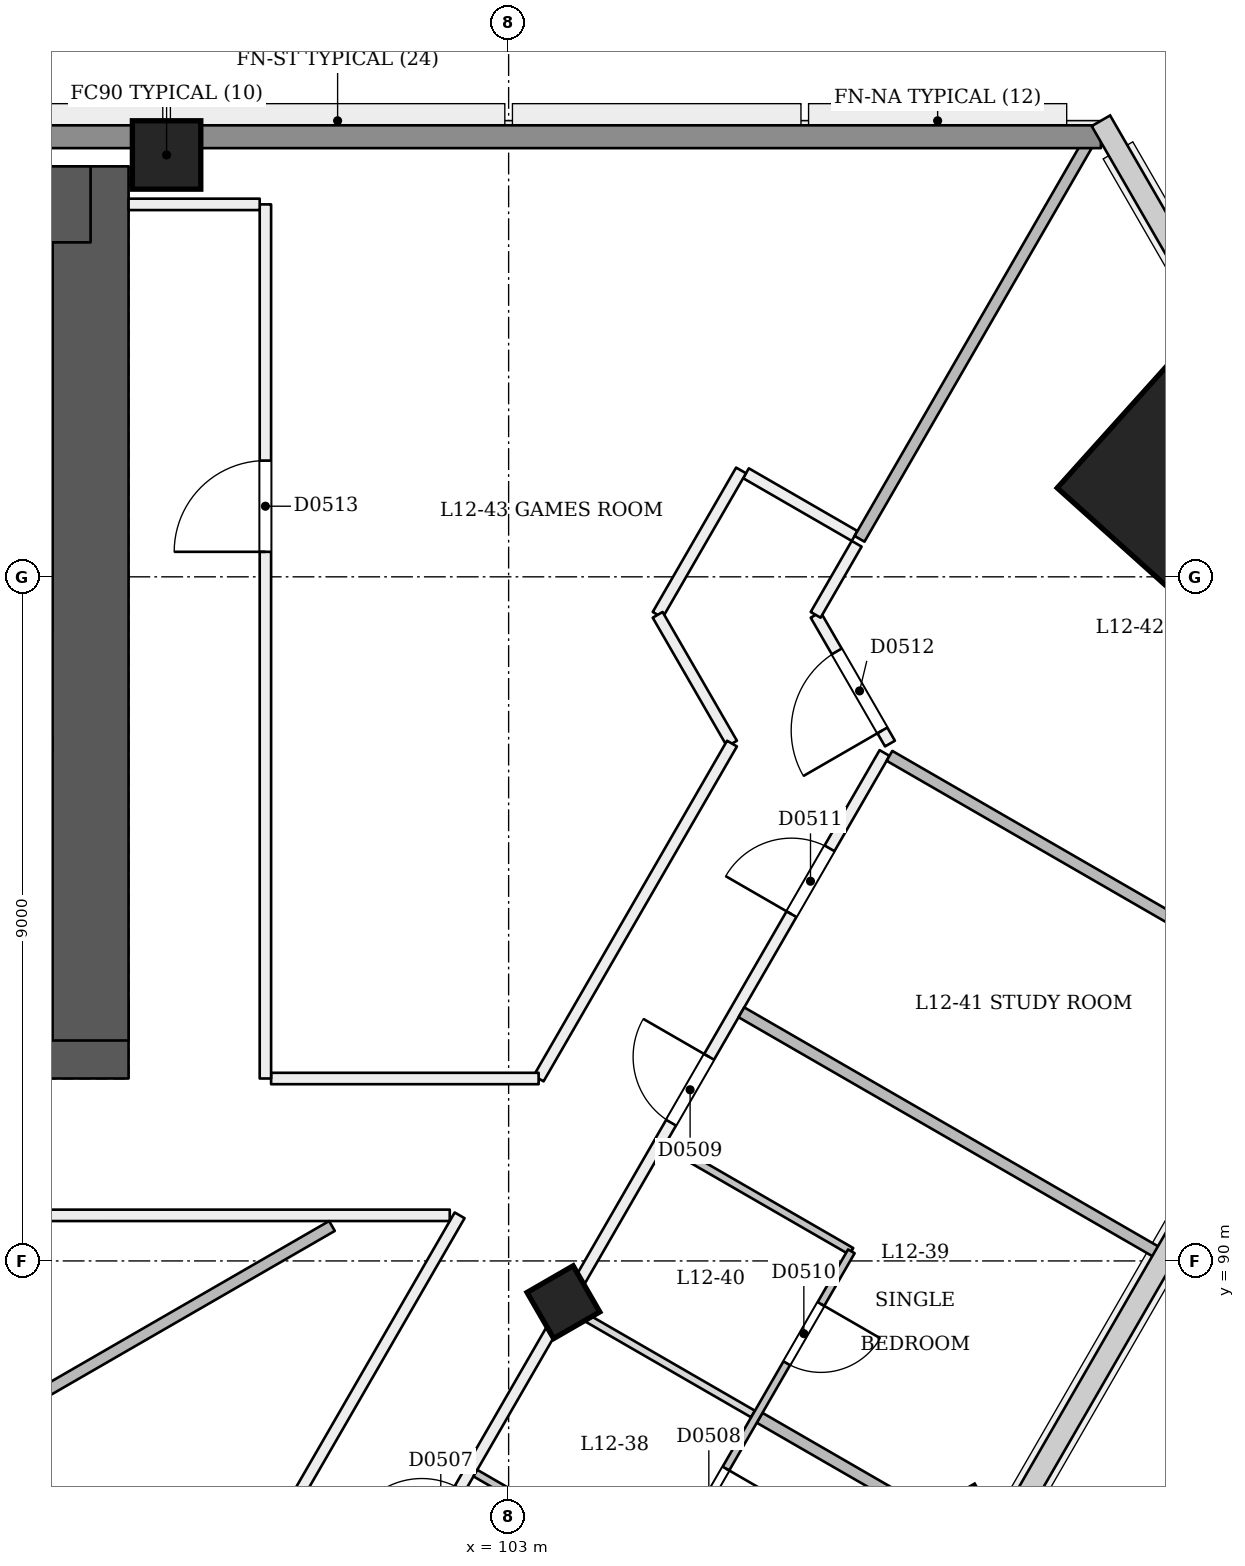
"""IFC4 building model, lengths in metres.
Left out: names, types, materials, properties, quantities, classifications, styles, units other than length and angle.
Written with IfcOpenShell. Run it as: python <this file> out.ifc"""

import sys

from ifc_helpers import new_model, si_unit, direction, frame, frame_2d, origin, origin_2d, place, context, subcontext, project, spatial, rectangle, extrude, element, fill, save


model = new_model("IFC4")
c1 = context("Model", 3, precision=1e-05, world=origin(), true_north=direction((0.0, 1.0)))
c2 = subcontext(c1, "Body", "Model", "MODEL_VIEW")
j1 = project(units=[si_unit("LENGTHUNIT", "METRE"), si_unit("PLANEANGLEUNIT", "RADIAN")], contexts=[c1])
p1 = place(None, origin())
s1 = spatial("IfcSite", under=j1, at=p1, CompositionType="ELEMENT")
p2 = place(p1, origin())
s2 = spatial("IfcBuilding", under=s1, at=p2, CompositionType="ELEMENT")
p3 = place(p2, frame((0.0, 0.0, 52.2)))
s3 = spatial("IfcBuildingStorey", under=s2, at=p3, CompositionType="ELEMENT", Elevation=52.2)
p4 = place(p3, frame((72.5, 92.9, 0.0), z_axis=(0.0, 0.0, 1.0), x_axis=(1.0, 0.0, 0.0)))
e1 = element("IfcWall", 1, at=p4, inside=s3, PredefinedType="SHEAR", context=c2, shape_type="SweptSolid", body=[
    extrude(rectangle(XDim=25.5, YDim=1.0, at=frame_2d((12.75, 0.0))), origin(), (0.0, 0.0, 1.0), 3.6),
])
p5 = place(p4, frame((1.3, 0.0, 0.0)))
e2 = element("IfcOpeningElement", 2, at=p5, cuts=e1, PredefinedType="OPENING", context=c2, shape_type="SweptSolid", body=[
    extrude(rectangle(XDim=1.2, YDim=2.1, at=frame_2d((0.6, 1.05))), frame((0.0, 0.51, 0.0), z_axis=(0.0, -1.0, 0.0), x_axis=(1.0, 0.0, 0.0)), (0.0, 0.0, 1.0), 1.021),
])
p6 = place(p4, frame((3.5, 0.0, 0.0)))
e3 = element("IfcOpeningElement", 3, at=p6, cuts=e1, PredefinedType="OPENING", context=c2, shape_type="SweptSolid", body=[
    extrude(rectangle(XDim=1.2, YDim=2.1, at=frame_2d((0.6, 1.05))), frame((0.0, 0.51, 0.0), z_axis=(0.0, -1.0, 0.0), x_axis=(1.0, 0.0, 0.0)), (0.0, 0.0, 1.0), 1.021),
])
p7 = place(p4, frame((13.5, 0.0, 0.0)))
e4 = element("IfcOpeningElement", 4, at=p7, cuts=e1, PredefinedType="OPENING", context=c2, shape_type="SweptSolid", body=[
    extrude(rectangle(XDim=1.2, YDim=2.1, at=frame_2d((0.6, 1.05))), frame((0.0, 0.51, 0.0), z_axis=(0.0, -1.0, 0.0), x_axis=(1.0, 0.0, 0.0)), (0.0, 0.0, 1.0), 1.021),
])
p8 = place(p4, frame((15.462, 0.0, 0.0)))
e5 = element("IfcOpeningElement", 5, at=p8, cuts=e1, PredefinedType="OPENING", context=c2, shape_type="SweptSolid", body=[
    extrude(rectangle(XDim=1.0, YDim=2.1, at=frame_2d((0.5, 1.05))), frame((0.0, 0.51, 0.0), z_axis=(0.0, -1.0, 0.0), x_axis=(1.0, 0.0, 0.0)), (0.0, 0.0, 1.0), 1.021),
])
p9 = place(p4, frame((18.3, 0.0, 0.0)))
e6 = element("IfcOpeningElement", 6, at=p9, cuts=e1, PredefinedType="OPENING", context=c2, shape_type="SweptSolid", body=[
    extrude(rectangle(XDim=1.0, YDim=2.1, at=frame_2d((0.5, 1.05))), frame((0.0, 0.51, 0.0), z_axis=(0.0, -1.0, 0.0), x_axis=(1.0, 0.0, 0.0)), (0.0, 0.0, 1.0), 1.021),
])
p10 = place(p4, frame((21.2, 0.0, 0.0)))
e7 = element("IfcOpeningElement", 7, at=p10, cuts=e1, PredefinedType="OPENING", context=c2, shape_type="SweptSolid", body=[
    extrude(rectangle(XDim=1.0, YDim=2.1, at=frame_2d((0.5, 1.05))), frame((0.0, 0.51, 0.0), z_axis=(0.0, -1.0, 0.0), x_axis=(1.0, 0.0, 0.0)), (0.0, 0.0, 1.0), 1.021),
])
p11 = place(p4, frame((23.087, 0.0, 0.0)))
e8 = element("IfcOpeningElement", 8, at=p11, cuts=e1, PredefinedType="OPENING", context=c2, shape_type="SweptSolid", body=[
    extrude(rectangle(XDim=1.0, YDim=2.1, at=frame_2d((0.5, 1.05))), frame((0.0, 0.51, 0.0), z_axis=(0.0, -1.0, 0.0), x_axis=(1.0, 0.0, 0.0)), (0.0, 0.0, 1.0), 1.021),
])
p12 = place(p3, frame((97.5, 92.9, 0.0), z_axis=(0.0, 0.0, 1.0), x_axis=(0.0, 1.0, 0.0)))
e9 = element("IfcWall", 9, at=p12, inside=s3, PredefinedType="SHEAR", context=c2, shape_type="SweptSolid", body=[
    extrude(rectangle(XDim=11.5, YDim=1.0, at=frame_2d((5.75, 0.0))), origin(), (0.0, 0.0, 1.0), 3.6),
])
p13 = place(p3, frame((97.5, 103.9, 0.0), z_axis=(0.0, 0.0, 1.0), x_axis=(-1.0, 0.0, 0.0)))
e10 = element("IfcWall", 10, at=p13, inside=s3, PredefinedType="SHEAR", context=c2, shape_type="SweptSolid", body=[
    extrude(rectangle(XDim=25.5, YDim=1.0, at=frame_2d((12.75, 0.0))), origin(), (0.0, 0.0, 1.0), 3.6),
])
p14 = place(p3, frame((103.748, 89.41, -0.021), z_axis=(-0.02215369191, 0.038413282303, 0.999016333038), x_axis=(-0.500660054594, -0.865359998658, 0.022171658849)))
e11 = element("IfcColumn", 11, at=p14, inside=s3, PredefinedType="COLUMN", context=c2, shape_type="SweptSolid", body=[
    extrude(rectangle(XDim=0.7, YDim=0.7, at=origin_2d()), origin(), (0.0, 0.0, 1.0), 3.604),
])
p15 = place(p3, frame((112.031, 100.253, 0.0), z_axis=(-0.028401796786, 0.009286506348, 0.999553449666), x_axis=(0.49888889343, -0.8663809353, 0.02222491757)))
e12 = element("IfcColumn", 12, at=p15, inside=s3, PredefinedType="COLUMN", context=c2, shape_type="SweptSolid", body=[
    extrude(rectangle(XDim=2.52, YDim=2.52, at=origin_2d()), origin(), (0.0, 0.0, 1.0), 3.602),
])
p16 = place(p3, frame((98.5, 104.55, 0.0), z_axis=(0.0, 0.0, 1.0), x_axis=(1.0, 0.0, 0.0)))
e13 = element("IfcColumn", 13, at=p16, inside=s3, PredefinedType="COLUMN", context=c2, shape_type="SweptSolid", body=[
    extrude(rectangle(XDim=0.9, YDim=0.9, at=origin_2d()), origin(), (0.0, 0.0, 1.0), 3.6),
])
p17 = place(p3, frame((108.988, 86.385, -0.027), z_axis=(-0.02222134892, 0.038480872521, 0.999012229206), x_axis=(-0.500177221778, -0.865637981187, 0.022217838368)))
e14 = element("IfcColumn", 14, at=p17, inside=s3, PredefinedType="COLUMN", context=c2, shape_type="SweptSolid", body=[
    extrude(rectangle(XDim=0.9, YDim=0.9, at=origin_2d()), origin(), (0.0, 0.0, 1.0), 3.604),
])
p18 = place(p3, frame((86.05, 58.757, 0.0), z_axis=(0.0, 0.0, 1.0), x_axis=(0.499999296855, 0.866025809745, 0.0)))
e15 = element("IfcWall", 15, at=p18, inside=s3, PredefinedType="PARTITIONING", context=c2, shape_type="SweptSolid", body=[
    extrude(rectangle(XDim=43.792, YDim=0.15, at=frame_2d((21.896, 0.0))), origin(), (0.0, 0.0, 1.0), 2.7),
])
p19 = place(p18, frame((3.598, 0.0, 0.0)))
e16 = element("IfcOpeningElement", 16, at=p19, cuts=e15, PredefinedType="OPENING", context=c2, shape_type="SweptSolid", body=[
    extrude(rectangle(XDim=1.2, YDim=2.1, at=frame_2d((0.6, 1.05))), frame((0.0, 0.085, 0.0), z_axis=(0.0, -1.0, 0.0), x_axis=(1.0, 0.0, 0.0)), (0.0, 0.0, 1.0), 0.171),
])
p20 = place(p18, frame((11.176, 0.0, 0.0)))
e17 = element("IfcOpeningElement", 17, at=p20, cuts=e15, PredefinedType="OPENING", context=c2, shape_type="SweptSolid", body=[
    extrude(rectangle(XDim=1.0, YDim=2.1, at=frame_2d((0.5, 1.05))), frame((0.0, 0.085, 0.0), z_axis=(0.0, -1.0, 0.0), x_axis=(1.0, 0.0, 0.0)), (0.0, 0.0, 1.0), 0.171),
])
p21 = place(p18, frame((13.616, 0.0, 0.0)))
e18 = element("IfcOpeningElement", 18, at=p21, cuts=e15, PredefinedType="OPENING", context=c2, shape_type="SweptSolid", body=[
    extrude(rectangle(XDim=1.0, YDim=2.1, at=frame_2d((0.5, 1.05))), frame((0.0, 0.085, 0.0), z_axis=(0.0, -1.0, 0.0), x_axis=(1.0, 0.0, 0.0)), (0.0, 0.0, 1.0), 0.171),
])
p22 = place(p18, frame((20.176, 0.0, 0.0)))
e19 = element("IfcOpeningElement", 19, at=p22, cuts=e15, PredefinedType="OPENING", context=c2, shape_type="SweptSolid", body=[
    extrude(rectangle(XDim=1.0, YDim=2.1, at=frame_2d((0.5, 1.05))), frame((0.0, 0.085, 0.0), z_axis=(0.0, -1.0, 0.0), x_axis=(1.0, 0.0, 0.0)), (0.0, 0.0, 1.0), 0.171),
])
p23 = place(p18, frame((22.616, 0.0, 0.0)))
e20 = element("IfcOpeningElement", 20, at=p23, cuts=e15, PredefinedType="OPENING", context=c2, shape_type="SweptSolid", body=[
    extrude(rectangle(XDim=1.0, YDim=2.1, at=frame_2d((0.5, 1.05))), frame((0.0, 0.085, 0.0), z_axis=(0.0, -1.0, 0.0), x_axis=(1.0, 0.0, 0.0)), (0.0, 0.0, 1.0), 0.171),
])
p24 = place(p18, frame((29.176, 0.0, 0.0)))
e21 = element("IfcOpeningElement", 21, at=p24, cuts=e15, PredefinedType="OPENING", context=c2, shape_type="SweptSolid", body=[
    extrude(rectangle(XDim=1.0, YDim=2.1, at=frame_2d((0.5, 1.05))), frame((0.0, 0.085, 0.0), z_axis=(0.0, -1.0, 0.0), x_axis=(1.0, 0.0, 0.0)), (0.0, 0.0, 1.0), 0.171),
])
p25 = place(p18, frame((31.616, 0.0, 0.0)))
e22 = element("IfcOpeningElement", 22, at=p25, cuts=e15, PredefinedType="OPENING", context=c2, shape_type="SweptSolid", body=[
    extrude(rectangle(XDim=1.0, YDim=2.1, at=frame_2d((0.5, 1.05))), frame((0.0, 0.085, 0.0), z_axis=(0.0, -1.0, 0.0), x_axis=(1.0, 0.0, 0.0)), (0.0, 0.0, 1.0), 0.171),
])
p26 = place(p18, frame((38.176, 0.0, 0.0)))
e23 = element("IfcOpeningElement", 23, at=p26, cuts=e15, PredefinedType="OPENING", context=c2, shape_type="SweptSolid", body=[
    extrude(rectangle(XDim=1.0, YDim=2.1, at=frame_2d((0.5, 1.05))), frame((0.0, 0.085, 0.0), z_axis=(0.0, -1.0, 0.0), x_axis=(1.0, 0.0, 0.0)), (0.0, 0.0, 1.0), 0.171),
])
p27 = place(p18, frame((41.344, 0.0, 0.0)))
e24 = element("IfcOpeningElement", 24, at=p27, cuts=e15, PredefinedType="OPENING", context=c2, shape_type="SweptSolid", body=[
    extrude(rectangle(XDim=1.0, YDim=2.1, at=frame_2d((0.5, 1.05))), frame((0.0, 0.085, 0.0), z_axis=(0.0, -1.0, 0.0), x_axis=(1.0, 0.0, 0.0)), (0.0, 0.0, 1.0), 0.171),
])
p28 = place(p3, frame((108.017, 96.806, 0.0), z_axis=(0.0, 0.0, 1.0), x_axis=(-0.499992620187, 0.866029664479, 0.0)))
e25 = element("IfcWall", 25, at=p28, inside=s3, PredefinedType="PARTITIONING", context=c2, shape_type="SweptSolid", body=[
    extrude(rectangle(XDim=1.956, YDim=0.15, at=frame_2d((0.978, 0.0))), origin(), (0.0, 0.0, 1.0), 3.1),
])
p29 = place(p28, frame((0.2, 0.0, 0.0)))
e26 = element("IfcOpeningElement", 26, at=p29, cuts=e25, PredefinedType="OPENING", context=c2, shape_type="SweptSolid", body=[
    extrude(rectangle(XDim=1.2, YDim=2.1, at=frame_2d((0.6, 1.05))), frame((0.0, 0.085, 0.0), z_axis=(0.0, -1.0, 0.0), x_axis=(1.0, 0.0, 0.0)), (0.0, 0.0, 1.0), 0.171),
])
p30 = place(p3, frame((107.039, 98.5, 0.0), z_axis=(0.0, 0.0, 1.0), x_axis=(0.499957341738, 0.866050031143, 0.0)))
e27 = element("IfcWall", 27, at=p30, inside=s3, PredefinedType="PARTITIONING", context=c2, shape_type="SweptSolid", body=[
    extrude(rectangle(XDim=1.08, YDim=0.15, at=frame_2d((0.54, 0.0))), origin(), (0.0, 0.0, 1.0), 3.1),
])
p31 = place(p3, frame((107.552, 99.538, 0.0), z_axis=(0.0, 0.0, 1.0), x_axis=(-0.866040211805, 0.499974350878, 0.0)))
e28 = element("IfcWall", 28, at=p31, inside=s3, PredefinedType="PARTITIONING", context=c2, shape_type="SweptSolid", body=[
    extrude(rectangle(XDim=1.65, YDim=0.15, at=frame_2d((0.825, 0.0))), origin(), (0.0, 0.0, 1.0), 3.1),
])
p32 = place(p3, frame((106.058, 100.4, 0.0), z_axis=(0.0, 0.0, 1.0), x_axis=(-0.500005024956, -0.866022502605, 0.0)))
e29 = element("IfcWall", 29, at=p32, inside=s3, PredefinedType="PARTITIONING", context=c2, shape_type="SweptSolid", body=[
    extrude(rectangle(XDim=2.194, YDim=0.15, at=frame_2d((1.097, 0.0))), origin(), (0.0, 0.0, 1.0), 3.1),
])
p33 = place(p3, frame((104.961, 98.5, 0.0), z_axis=(0.0, 0.0, 1.0), x_axis=(0.500086243919, -0.865975605109, 0.0)))
e30 = element("IfcWall", 30, at=p33, inside=s3, PredefinedType="PARTITIONING", context=c2, shape_type="SweptSolid", body=[
    extrude(rectangle(XDim=1.956, YDim=0.15, at=frame_2d((0.978, 0.0))), origin(), (0.0, 0.0, 1.0), 3.1),
])
p34 = place(p3, frame((105.939, 96.806, 0.0), z_axis=(0.0, 0.0, 1.0), x_axis=(-0.500014573982, -0.866016989329, 0.0)))
e31 = element("IfcWall", 31, at=p34, inside=s3, PredefinedType="PARTITIONING", context=c2, shape_type="SweptSolid", body=[
    extrude(rectangle(XDim=5.088, YDim=0.15, at=frame_2d((2.544, 0.0))), origin(), (0.0, 0.0, 1.0), 3.1),
])
p35 = place(p3, frame((103.395, 92.4, 0.0), z_axis=(0.0, 0.0, 1.0), x_axis=(-1.0, 0.0, 0.0)))
e32 = element("IfcWall", 32, at=p35, inside=s3, PredefinedType="PARTITIONING", context=c2, shape_type="SweptSolid", body=[
    extrude(rectangle(XDim=3.52, YDim=0.15, at=frame_2d((1.76, 0.0))), origin(), (0.0, 0.0, 1.0), 3.1),
])
p36 = place(p3, frame((99.8, 92.4, 0.0), z_axis=(0.0, 0.0, 1.0), x_axis=(0.0, 1.0, 0.0)))
e33 = element("IfcWall", 33, at=p36, inside=s3, PredefinedType="PARTITIONING", context=c2, shape_type="SweptSolid", body=[
    extrude(rectangle(XDim=11.5, YDim=0.15, at=frame_2d((5.75, 0.0))), origin(), (0.0, 0.0, 1.0), 2.6),
])
p37 = place(p36, frame((6.929, 0.0, 0.0)))
e34 = element("IfcOpeningElement", 34, at=p37, cuts=e33, PredefinedType="OPENING", context=c2, shape_type="SweptSolid", body=[
    extrude(rectangle(XDim=1.2, YDim=2.1, at=frame_2d((0.6, 1.05))), frame((0.0, 0.085, 0.0), z_axis=(0.0, -1.0, 0.0), x_axis=(1.0, 0.0, 0.0)), (0.0, 0.0, 1.0), 0.171),
])
p38 = place(p3, frame((99.725, 103.9, 0.0), z_axis=(0.0, 0.0, 1.0), x_axis=(-1.0, 0.0, 0.0)))
e35 = element("IfcWall", 35, at=p38, inside=s3, PredefinedType="PARTITIONING", context=c2, shape_type="SweptSolid", body=[
    extrude(rectangle(XDim=1.725, YDim=0.15, at=frame_2d((0.863, 0.0))), origin(), (0.0, 0.0, 1.0), 2.6),
])
p39 = place(p3, frame((102.355, 90.6, 0.0), z_axis=(0.0, 0.0, 1.0), x_axis=(-0.500000924128, -0.866024870238, 0.0)))
e36 = element("IfcWall", 36, at=p39, inside=s3, PredefinedType="PARTITIONING", context=c2, shape_type="SweptSolid", body=[
    extrude(rectangle(XDim=34.581, YDim=0.15, at=frame_2d((17.291, 0.0))), origin(), (0.0, 0.0, 1.0), 3.1),
])
p40 = place(p39, frame((9.118, 0.0, 0.0)))
e37 = element("IfcOpeningElement", 37, at=p40, cuts=e36, PredefinedType="OPENING", context=c2, shape_type="SweptSolid", body=[
    extrude(rectangle(XDim=1.2, YDim=2.1, at=frame_2d((0.6, 1.05))), frame((0.0, 0.085, 0.0), z_axis=(0.0, -1.0, 0.0), x_axis=(1.0, 0.0, 0.0)), (0.0, 0.0, 1.0), 0.171),
])
p41 = place(p3, frame((88.0, 90.599, 0.0), z_axis=(0.0, 0.0, 1.0), x_axis=(0.999999997644, 6.8649493e-05, 0.0)))
e38 = element("IfcWall", 38, at=p41, inside=s3, PredefinedType="PARTITIONING", context=c2, shape_type="SweptSolid", body=[
    extrude(rectangle(XDim=14.225, YDim=0.15, at=frame_2d((7.113, 0.0))), origin(), (0.0, 0.0, 1.0), 3.1),
])
p42 = place(p41, frame((4.457, 0.0, 0.0)))
e39 = element("IfcOpeningElement", 39, at=p42, cuts=e38, PredefinedType="OPENING", context=c2, shape_type="SweptSolid", body=[
    extrude(rectangle(XDim=1.0, YDim=2.1, at=frame_2d((0.5, 1.05))), frame((0.0, 0.085, 0.0), z_axis=(0.0, -1.0, 0.0), x_axis=(1.0, 0.0, 0.0)), (0.0, 0.0, 1.0), 0.171),
])
p43 = place(p3, frame((105.009, 85.796, 0.0), z_axis=(0.0, 0.0, 1.0), x_axis=(-0.866048868473, 0.499959355765, 0.0)))
e40 = element("IfcWall", 40, at=p43, inside=s3, PredefinedType="PARTITIONING", context=c2, shape_type="SweptSolid", body=[
    extrude(rectangle(XDim=2.825, YDim=0.1, at=frame_2d((1.413, 0.0))), origin(), (0.0, 0.0, 1.0), 3.1),
])
p44 = place(p3, frame((109.29, 86.211, 0.0), z_axis=(0.0, 0.0, 1.0), x_axis=(-0.866013532718, 0.500020560727, 0.0)))
e41 = element("IfcWall", 41, at=p44, inside=s3, PredefinedType="PARTITIONING", context=c2, shape_type="SweptSolid", body=[
    extrude(rectangle(XDim=3.45, YDim=0.15, at=frame_2d((1.725, 0.0))), origin(), (0.0, 0.0, 1.0), 2.6),
])
p45 = place(p3, frame((106.216, 87.986, 0.0), z_axis=(0.0, 0.0, 1.0), x_axis=(-0.865981921271, 0.50007530636, 0.0)))
e42 = element("IfcWall", 42, at=p45, inside=s3, PredefinedType="PARTITIONING", context=c2, shape_type="SweptSolid", body=[
    extrude(rectangle(XDim=2.775, YDim=0.1, at=frame_2d((1.387, 0.0))), origin(), (0.0, 0.0, 1.0), 2.7),
])
p46 = place(p3, frame((105.062, 91.539, 0.0), z_axis=(0.0, 0.0, 1.0), x_axis=(0.866011447264, -0.500024172624, 0.0)))
e43 = element("IfcWall", 43, at=p46, inside=s3, PredefinedType="PARTITIONING", context=c2, shape_type="SweptSolid", body=[
    extrude(rectangle(XDim=2.825, YDim=0.1, at=frame_2d((1.413, 0.0))), origin(), (0.0, 0.0, 1.0), 3.1),
])
p47 = place(p3, frame((107.509, 90.126, 0.0), z_axis=(0.0, 0.0, 1.0), x_axis=(-0.500004234368, -0.866022959057, 0.0)))
e44 = element("IfcWall", 44, at=p47, inside=s3, PredefinedType="PARTITIONING", context=c2, shape_type="SweptSolid", body=[
    extrude(rectangle(XDim=5.0, YDim=0.1, at=frame_2d((2.5, 0.0))), origin(), (0.0, 0.0, 1.0), 2.7),
])
p48 = place(p47, frame((3.3, 0.0, 0.0)))
e45 = element("IfcOpeningElement", 45, at=p48, cuts=e44, PredefinedType="OPENING", context=c2, shape_type="SweptSolid", body=[
    extrude(rectangle(XDim=0.9, YDim=2.1, at=frame_2d((0.45, 1.05))), frame((0.0, 0.061, 0.0), z_axis=(0.0, -1.0, 0.0), x_axis=(1.0, 0.0, 0.0)), (0.0, 0.0, 1.0), 0.121),
])
p49 = place(p47, frame((0.8, 0.0, 0.0)))
e46 = element("IfcOpeningElement", 46, at=p49, cuts=e44, PredefinedType="OPENING", context=c2, shape_type="SweptSolid", body=[
    extrude(rectangle(XDim=0.9, YDim=2.1, at=frame_2d((0.45, 1.05))), frame((0.0, 0.061, 0.0), z_axis=(0.0, -1.0, 0.0), x_axis=(1.0, 0.0, 0.0)), (0.0, 0.0, 1.0), 0.121),
])
for number, where, z_axis, x_axis in (
    (47, (111.558, 90.098, 0.0), (0.0, 0.0, 1.0), (-0.866, 0.5, 0.0)),
    (48, (113.506, 93.472, 0.0), (0.0, 0.0, 1.0), (-0.866, 0.5, 0.0)),
):
    element("IfcWall", number, at=place(p3, frame(where, z_axis=z_axis, x_axis=x_axis)), inside=s3, PredefinedType="PARTITIONING", context=c2, shape_type="SweptSolid", body=[
        extrude(rectangle(XDim=6.345, YDim=0.15, at=frame_2d((3.173, 0.0))), origin(), (0.0, 0.0, 1.0), 2.6),
    ])
p50 = place(p3, frame((110.734, 104.9, 0.0), z_axis=(0.0, 0.0, 1.0), x_axis=(-0.500034261589, -0.866005621943, 0.0)))
e49 = element("IfcWall", 49, at=p50, inside=s3, PredefinedType="PARTITIONING", context=c2, shape_type="SweptSolid", body=[
    extrude(rectangle(XDim=6.235, YDim=0.15, at=frame_2d((3.118, 0.0))), origin(), (0.0, 0.0, 1.0), 2.6),
])
p51 = place(p3, frame((100.676, 90.46, 0.0), z_axis=(0.0, 0.0, 1.0), x_axis=(-0.866019571687, -0.500010101354, 0.0)))
e50 = element("IfcWall", 50, at=p51, inside=s3, PredefinedType="PARTITIONING", context=c2, shape_type="SweptSolid", body=[
    extrude(rectangle(XDim=13.641, YDim=0.15, at=frame_2d((6.82, 0.0))), origin(), (0.0, 0.0, 1.0), 3.1),
])
p52 = place(p3, frame((59.208, 104.79, 0.0), z_axis=(0.0, 0.0, 1.0), x_axis=(1.0, 0.0, 0.0)))
e51 = element("IfcWall", 51, at=p52, inside=s3, PredefinedType="SOLIDWALL", context=c2, shape_type="SweptSolid", body=[
    extrude(rectangle(XDim=51.584, YDim=0.3, at=frame_2d((25.792, 0.0))), origin(), (0.0, 0.0, 1.0), 2.6),
])
p53 = place(p48, origin())
e52 = element("IfcDoor", 52, at=p53, inside=s3, OperationType="SINGLE_SWING_LEFT", PredefinedType="NOTDEFINED", context=c2, shape_type="SweptSolid", body=[
    extrude(rectangle(XDim=0.9, YDim=2.1, at=frame_2d((0.45, 1.05))), frame((0.0, 0.025, 0.0), z_axis=(0.0, -1.0, 0.0), x_axis=(1.0, 0.0, 0.0)), (0.0, 0.0, 1.0), 0.05),
])
fill(e45, e52)
p54 = place(p26, origin())
e53 = element("IfcDoor", 53, at=p54, inside=s3, OperationType="SINGLE_SWING_RIGHT", PredefinedType="NOTDEFINED", context=c2, shape_type="SweptSolid", body=[
    extrude(rectangle(XDim=1.0, YDim=2.1, at=frame_2d((0.5, 1.05))), frame((0.0, 0.025, 0.0), z_axis=(0.0, -1.0, 0.0), x_axis=(1.0, 0.0, 0.0)), (0.0, 0.0, 1.0), 0.05),
])
fill(e23, e53)
p55 = place(p49, origin())
e54 = element("IfcDoor", 54, at=p55, inside=s3, OperationType="SINGLE_SWING_LEFT", PredefinedType="NOTDEFINED", context=c2, shape_type="SweptSolid", body=[
    extrude(rectangle(XDim=0.9, YDim=2.1, at=frame_2d((0.45, 1.05))), frame((0.0, 0.025, 0.0), z_axis=(0.0, -1.0, 0.0), x_axis=(1.0, 0.0, 0.0)), (0.0, 0.0, 1.0), 0.05),
])
fill(e46, e54)
p56 = place(p27, origin())
e55 = element("IfcDoor", 55, at=p56, inside=s3, OperationType="SINGLE_SWING_LEFT", PredefinedType="NOTDEFINED", context=c2, shape_type="SweptSolid", body=[
    extrude(rectangle(XDim=1.0, YDim=2.1, at=frame_2d((0.5, 1.05))), frame((0.0, 0.025, 0.0), z_axis=(0.0, -1.0, 0.0), x_axis=(1.0, 0.0, 0.0)), (0.0, 0.0, 1.0), 0.05),
])
fill(e24, e55)
p57 = place(p29, origin())
e56 = element("IfcDoor", 56, at=p57, inside=s3, OperationType="SINGLE_SWING_LEFT", PredefinedType="NOTDEFINED", context=c2, shape_type="SweptSolid", body=[
    extrude(rectangle(XDim=1.2, YDim=2.1, at=frame_2d((0.6, 1.05))), frame((0.0, 0.025, 0.0), z_axis=(0.0, -1.0, 0.0), x_axis=(1.0, 0.0, 0.0)), (0.0, 0.0, 1.0), 0.05),
])
fill(e26, e56)
p58 = place(p37, origin())
e57 = element("IfcDoor", 57, at=p58, inside=s3, OperationType="SINGLE_SWING_LEFT", PredefinedType="NOTDEFINED", context=c2, shape_type="SweptSolid", body=[
    extrude(rectangle(XDim=1.2, YDim=2.1, at=frame_2d((0.6, 1.05))), frame((0.0, 0.025, 0.0), z_axis=(0.0, -1.0, 0.0), x_axis=(1.0, 0.0, 0.0)), (0.0, 0.0, 1.0), 0.05),
])
fill(e34, e57)
save(model, sys.argv[1])
